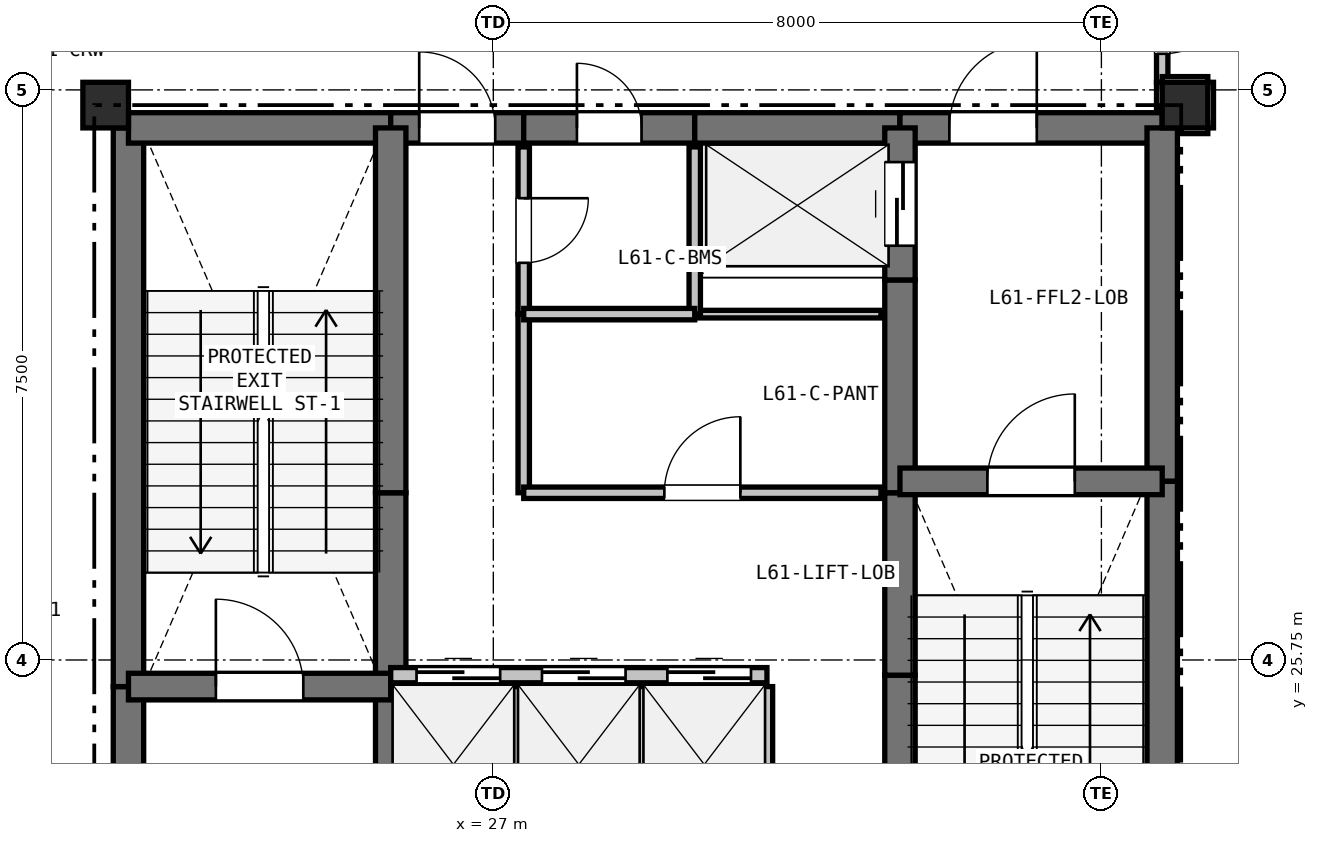
"""IFC4 building model, lengths in metres.
Left out: names, types, materials, properties, quantities, classifications, styles, units other than length and angle.
Written with IfcOpenShell. Run it as: python <this file> out.ifc"""

import sys

from ifc_helpers import new_model, si_unit, direction, frame, frame_2d, origin, origin_2d, place, context, subcontext, project, spatial, rectangle, extrude, element, fill, save


model = new_model("IFC4")
c1 = context("Model", 3, precision=1e-05, world=origin(), true_north=direction((0.0, 1.0)))
c2 = subcontext(c1, "Body", "Model", "MODEL_VIEW")
j1 = project(units=[si_unit("LENGTHUNIT", "METRE"), si_unit("PLANEANGLEUNIT", "RADIAN")], contexts=[c1])
p1 = place(None, origin())
s1 = spatial("IfcSite", under=j1, at=p1, CompositionType="ELEMENT")
p2 = place(p1, origin())
s2 = spatial("IfcBuilding", under=s1, at=p2, CompositionType="ELEMENT")
p3 = place(p2, frame((0.0, 0.0, 218.4)))
s3 = spatial("IfcBuildingStorey", under=s2, at=p3, CompositionType="ELEMENT", Elevation=218.4)
for number, where, z_axis, x_axis in (
    (1, (21.9, 33.05, 0.0), (0.0, 0.0, 1.0), (1.0, 0.0, 0.0)),
    (2, (36.1, 33.05, 0.0), (0.0, 0.0, 1.0), (1.0, 0.0, 0.0)),
):
    element("IfcColumn", number, at=place(p3, frame(where, z_axis=z_axis, x_axis=x_axis)), inside=s3, PredefinedType="COLUMN", context=c2, shape_type="SweptSolid", body=[
        extrude(rectangle(XDim=0.6, YDim=0.6, at=origin_2d()), origin(), (0.0, 0.0, 1.0), 4.8),
    ])
p4 = place(p3, frame((22.2, 20.75, 0.0), z_axis=(0.0, 0.0, 1.0), x_axis=(0.0, 1.0, 0.0)))
e3 = element("IfcWall", 3, at=p4, inside=s3, PredefinedType="SHEAR", context=c2, shape_type="SweptSolid", body=[
    extrude(rectangle(XDim=4.65, YDim=0.4, at=frame_2d((2.325, 0.0))), origin(), (0.0, 0.0, 1.0), 4.58),
])
p5 = place(p3, frame((22.2, 25.4, 0.0), z_axis=(0.0, 0.0, 1.0), x_axis=(0.0, 1.0, 0.0)))
e4 = element("IfcWall", 4, at=p5, inside=s3, PredefinedType="SHEAR", context=c2, shape_type="SweptSolid", body=[
    extrude(rectangle(XDim=7.35, YDim=0.4, at=frame_2d((3.675, 0.0))), origin(), (0.0, 0.0, 1.0), 4.58),
])
p6 = place(p3, frame((22.2, 32.75, 0.0), z_axis=(0.0, 0.0, 1.0), x_axis=(1.0, 0.0, 0.0)))
e5 = element("IfcWall", 5, at=p6, inside=s3, PredefinedType="SHEAR", context=c2, shape_type="SweptSolid", body=[
    extrude(rectangle(XDim=3.45, YDim=0.4, at=frame_2d((1.725, 0.0))), origin(), (0.0, 0.0, 1.0), 4.58),
])
p7 = place(p3, frame((25.65, 32.75, 0.0), z_axis=(0.0, 0.0, 1.0), x_axis=(1.0, 0.0, 0.0)))
e6 = element("IfcWall", 6, at=p7, inside=s3, PredefinedType="SHEAR", context=c2, shape_type="SweptSolid", body=[
    extrude(rectangle(XDim=1.75, YDim=0.4, at=frame_2d((0.875, 0.0))), origin(), (0.0, 0.0, 1.0), 4.58),
])
p8 = place(p7, frame((0.375, 0.0, 0.0)))
e7 = element("IfcOpeningElement", 7, at=p8, cuts=e6, PredefinedType="OPENING", context=c2, shape_type="SweptSolid", body=[
    extrude(rectangle(XDim=1.0, YDim=2.15, at=frame_2d((0.5, 1.075))), frame((0.0, 0.21, 0.0), z_axis=(0.0, -1.0, 0.0), x_axis=(1.0, 0.0, 0.0)), (0.0, 0.0, 1.0), 0.42),
])
p9 = place(p3, frame((27.4, 32.75, 0.0), z_axis=(0.0, 0.0, 1.0), x_axis=(1.0, 0.0, 0.0)))
e8 = element("IfcWall", 8, at=p9, inside=s3, PredefinedType="SHEAR", context=c2, shape_type="SweptSolid", body=[
    extrude(rectangle(XDim=2.25, YDim=0.4, at=frame_2d((1.125, 0.0))), origin(), (0.0, 0.0, 1.0), 4.58),
])
p10 = place(p9, frame((0.7, 0.0, 0.0)))
e9 = element("IfcOpeningElement", 9, at=p10, cuts=e8, PredefinedType="OPENING", context=c2, shape_type="SweptSolid", body=[
    extrude(rectangle(XDim=0.85, YDim=2.1, at=frame_2d((0.425, 1.05))), frame((0.0, 0.21, 0.0), z_axis=(0.0, -1.0, 0.0), x_axis=(1.0, 0.0, 0.0)), (0.0, 0.0, 1.0), 0.42),
])
p11 = place(p3, frame((29.65, 32.75, 0.0), z_axis=(0.0, 0.0, 1.0), x_axis=(1.0, 0.0, 0.0)))
e10 = element("IfcWall", 10, at=p11, inside=s3, PredefinedType="SHEAR", context=c2, shape_type="SweptSolid", body=[
    extrude(rectangle(XDim=2.7, YDim=0.4, at=frame_2d((1.35, 0.0))), origin(), (0.0, 0.0, 1.0), 4.58),
])
p12 = place(p3, frame((32.35, 32.75, 0.0), z_axis=(0.0, 0.0, 1.0), x_axis=(1.0, 0.0, 0.0)))
e11 = element("IfcWall", 11, at=p12, inside=s3, PredefinedType="SHEAR", context=c2, shape_type="SweptSolid", body=[
    extrude(rectangle(XDim=3.45, YDim=0.4, at=frame_2d((1.725, 0.0))), origin(), (0.0, 0.0, 1.0), 4.58),
])
p13 = place(p12, frame((0.65, 0.0, 0.0)))
e12 = element("IfcOpeningElement", 12, at=p13, cuts=e11, PredefinedType="OPENING", context=c2, shape_type="SweptSolid", body=[
    extrude(rectangle(XDim=1.15, YDim=2.15, at=frame_2d((0.575, 1.075))), frame((0.0, 0.21, 0.0), z_axis=(0.0, -1.0, 0.0), x_axis=(1.0, 0.0, 0.0)), (0.0, 0.0, 1.0), 0.42),
])
p14 = place(p3, frame((35.8, 32.75, 0.0), z_axis=(0.0, 0.0, 1.0), x_axis=(0.0, -1.0, 0.0)))
e13 = element("IfcWall", 13, at=p14, inside=s3, PredefinedType="SHEAR", context=c2, shape_type="SweptSolid", body=[
    extrude(rectangle(XDim=4.65, YDim=0.4, at=frame_2d((2.325, 0.0))), origin(), (0.0, 0.0, 1.0), 4.58),
])
p15 = place(p3, frame((35.8, 28.1, 0.0), z_axis=(0.0, 0.0, 1.0), x_axis=(0.0, -1.0, 0.0)))
e14 = element("IfcWall", 14, at=p15, inside=s3, PredefinedType="SHEAR", context=c2, shape_type="SweptSolid", body=[
    extrude(rectangle(XDim=7.35, YDim=0.4, at=frame_2d((3.675, 0.0))), origin(), (0.0, 0.0, 1.0), 4.58),
])
p16 = place(p3, frame((25.65, 22.75, 0.0), z_axis=(0.0, 0.0, 1.0), x_axis=(0.0, 1.0, 0.0)))
e15 = element("IfcWall", 15, at=p16, inside=s3, PredefinedType="SHEAR", context=c2, shape_type="SweptSolid", body=[
    extrude(rectangle(XDim=2.8, YDim=0.4, at=frame_2d((1.4, 0.0))), origin(), (0.0, 0.0, 1.0), 4.58),
])
p17 = place(p3, frame((25.65, 25.55, 0.0), z_axis=(0.0, 0.0, 1.0), x_axis=(0.0, 1.0, 0.0)))
e16 = element("IfcWall", 16, at=p17, inside=s3, PredefinedType="SHEAR", context=c2, shape_type="SweptSolid", body=[
    extrude(rectangle(XDim=2.4, YDim=0.4, at=frame_2d((1.2, 0.0))), origin(), (0.0, 0.0, 1.0), 4.58),
])
for number, where, z_axis, x_axis in (
    (17, (25.65, 27.95, 0.0), (0.0, 0.0, 1.0), (0.0, 1.0, 0.0)),
    (18, (32.35, 20.75, 0.0), (0.0, 0.0, 1.0), (0.0, 1.0, 0.0)),
):
    element("IfcWall", number, at=place(p3, frame(where, z_axis=z_axis, x_axis=x_axis)), inside=s3, PredefinedType="SHEAR", context=c2, shape_type="SweptSolid", body=[
        extrude(rectangle(XDim=4.8, YDim=0.4, at=frame_2d((2.4, 0.0))), origin(), (0.0, 0.0, 1.0), 4.58),
    ])
p18 = place(p3, frame((32.35, 25.55, 0.0), z_axis=(0.0, 0.0, 1.0), x_axis=(0.0, 1.0, 0.0)))
e19 = element("IfcWall", 19, at=p18, inside=s3, PredefinedType="SHEAR", context=c2, shape_type="SweptSolid", body=[
    extrude(rectangle(XDim=2.4, YDim=0.4, at=frame_2d((1.2, 0.0))), origin(), (0.0, 0.0, 1.0), 4.58),
])
p19 = place(p3, frame((32.35, 27.95, 0.0), z_axis=(0.0, 0.0, 1.0), x_axis=(0.0, 1.0, 0.0)))
e20 = element("IfcWall", 20, at=p19, inside=s3, PredefinedType="SHEAR", context=c2, shape_type="SweptSolid", body=[
    extrude(rectangle(XDim=2.8, YDim=0.4, at=frame_2d((1.4, 0.0))), origin(), (0.0, 0.0, 1.0), 4.58),
])
p20 = place(p3, frame((32.35, 30.75, 0.0), z_axis=(0.0, 0.0, 1.0), x_axis=(0.0, 1.0, 0.0)))
e21 = element("IfcWall", 21, at=p20, inside=s3, PredefinedType="SHEAR", context=c2, shape_type="SweptSolid", body=[
    extrude(rectangle(XDim=2.0, YDim=0.4, at=frame_2d((1.0, 0.0))), origin(), (0.0, 0.0, 1.0), 4.58),
])
p21 = place(p20, frame((0.45, 0.0, 0.0)))
e22 = element("IfcOpeningElement", 22, at=p21, cuts=e21, PredefinedType="OPENING", context=c2, shape_type="SweptSolid", body=[
    extrude(rectangle(XDim=1.1, YDim=2.15, at=frame_2d((0.55, 1.075))), frame((0.0, 0.21, 0.0), z_axis=(0.0, -1.0, 0.0), x_axis=(1.0, 0.0, 0.0)), (0.0, 0.0, 1.0), 0.42),
])
p22 = place(p3, frame((22.2, 25.4, 0.0), z_axis=(0.0, 0.0, 1.0), x_axis=(1.0, 0.0, 0.0)))
e23 = element("IfcWall", 23, at=p22, inside=s3, PredefinedType="SHEAR", context=c2, shape_type="SweptSolid", body=[
    extrude(rectangle(XDim=3.45, YDim=0.35, at=frame_2d((1.725, 0.0))), origin(), (0.0, 0.0, 1.0), 4.58),
])
p23 = place(p22, frame((1.15, 0.0, 0.0)))
e24 = element("IfcOpeningElement", 24, at=p23, cuts=e23, PredefinedType="OPENING", context=c2, shape_type="SweptSolid", body=[
    extrude(rectangle(XDim=1.15, YDim=2.15, at=frame_2d((0.575, 1.075))), frame((0.0, 0.185, 0.0), z_axis=(0.0, -1.0, 0.0), x_axis=(1.0, 0.0, 0.0)), (0.0, 0.0, 1.0), 0.37),
])
p24 = place(p3, frame((32.35, 28.1, 0.0), z_axis=(0.0, 0.0, 1.0), x_axis=(1.0, 0.0, 0.0)))
e25 = element("IfcWall", 25, at=p24, inside=s3, PredefinedType="SHEAR", context=c2, shape_type="SweptSolid", body=[
    extrude(rectangle(XDim=3.45, YDim=0.35, at=frame_2d((1.725, 0.0))), origin(), (0.0, 0.0, 1.0), 4.58),
])
p25 = place(p24, frame((1.15, 0.0, 0.0)))
e26 = element("IfcOpeningElement", 26, at=p25, cuts=e25, PredefinedType="OPENING", context=c2, shape_type="SweptSolid", body=[
    extrude(rectangle(XDim=1.15, YDim=2.15, at=frame_2d((0.575, 1.075))), frame((0.0, 0.185, 0.0), z_axis=(0.0, -1.0, 0.0), x_axis=(1.0, 0.0, 0.0)), (0.0, 0.0, 1.0), 0.37),
])
p26 = place(p3, frame((25.65, 25.55, 0.0), z_axis=(0.0, 0.0, 1.0), x_axis=(1.0, 0.0, 0.0)))
e27 = element("IfcWall", 27, at=p26, inside=s3, PredefinedType="PARTITIONING", context=c2, shape_type="SweptSolid", body=[
    extrude(rectangle(XDim=4.95, YDim=0.2, at=frame_2d((2.475, 0.0))), origin(), (0.0, 0.0, 1.0), 4.58),
])
p27 = place(p26, frame((0.34, 0.0, 0.0)))
e28 = element("IfcOpeningElement", 28, at=p27, cuts=e27, PredefinedType="OPENING", context=c2, shape_type="SweptSolid", body=[
    extrude(rectangle(XDim=1.1, YDim=2.15, at=frame_2d((0.55, 1.075))), frame((0.0, 0.11, 0.0), z_axis=(0.0, -1.0, 0.0), x_axis=(1.0, 0.0, 0.0)), (0.0, 0.0, 1.0), 0.22),
])
p28 = place(p26, frame((1.99, 0.0, 0.0)))
e29 = element("IfcOpeningElement", 29, at=p28, cuts=e27, PredefinedType="OPENING", context=c2, shape_type="SweptSolid", body=[
    extrude(rectangle(XDim=1.1, YDim=2.15, at=frame_2d((0.55, 1.075))), frame((0.0, 0.11, 0.0), z_axis=(0.0, -1.0, 0.0), x_axis=(1.0, 0.0, 0.0)), (0.0, 0.0, 1.0), 0.22),
])
p29 = place(p26, frame((3.64, 0.0, 0.0)))
e30 = element("IfcOpeningElement", 30, at=p29, cuts=e27, PredefinedType="OPENING", context=c2, shape_type="SweptSolid", body=[
    extrude(rectangle(XDim=1.1, YDim=2.15, at=frame_2d((0.55, 1.075))), frame((0.0, 0.11, 0.0), z_axis=(0.0, -1.0, 0.0), x_axis=(1.0, 0.0, 0.0)), (0.0, 0.0, 1.0), 0.22),
])
p30 = place(p3, frame((32.1, 30.3, 0.0), z_axis=(0.0, 0.0, 1.0), x_axis=(-1.0, 0.0, 0.0)))
e31 = element("IfcWall", 31, at=p30, inside=s3, PredefinedType="PARTITIONING", context=c2, shape_type="SweptSolid", body=[
    extrude(rectangle(XDim=2.45, YDim=0.1, at=frame_2d((1.225, 0.0))), origin(), (0.0, 0.0, 1.0), 4.58),
])
p31 = place(p3, frame((29.65, 30.3, 0.0), z_axis=(0.0, 0.0, 1.0), x_axis=(0.0, 1.0, 0.0)))
e32 = element("IfcWall", 32, at=p31, inside=s3, PredefinedType="PARTITIONING", context=c2, shape_type="SweptSolid", body=[
    extrude(rectangle(XDim=2.2, YDim=0.15, at=frame_2d((1.1, 0.0))), origin(), (0.0, 0.0, 1.0), 4.58),
])
p32 = place(p3, frame((27.3, 25.4, 0.0), z_axis=(0.0, 0.0, 1.0), x_axis=(0.0, -1.0, 0.0)))
e33 = element("IfcWall", 33, at=p32, inside=s3, PredefinedType="PARTITIONING", context=c2, shape_type="SweptSolid", body=[
    extrude(rectangle(XDim=2.2, YDim=0.1, at=frame_2d((1.1, 0.0))), origin(), (0.0, 0.0, 1.0), 4.58),
])
p33 = place(p3, frame((28.95, 25.4, 0.0), z_axis=(0.0, 0.0, 1.0), x_axis=(0.0, -1.0, 0.0)))
e34 = element("IfcWall", 34, at=p33, inside=s3, PredefinedType="PARTITIONING", context=c2, shape_type="SweptSolid", body=[
    extrude(rectangle(XDim=2.2, YDim=0.125, at=frame_2d((1.1, 0.0))), origin(), (0.0, 0.0, 1.0), 4.58),
])
p34 = place(p3, frame((30.6, 25.4, 0.0), z_axis=(0.0, 0.0, 1.0), x_axis=(0.0, -1.0, 0.0)))
e35 = element("IfcWall", 35, at=p34, inside=s3, PredefinedType="PARTITIONING", context=c2, shape_type="SweptSolid", body=[
    extrude(rectangle(XDim=2.2, YDim=0.15, at=frame_2d((1.1, 0.0))), origin(), (0.0, 0.0, 1.0), 4.58),
])
p35 = place(p3, frame((27.4, 32.5, 0.0), z_axis=(0.0, 0.0, 1.0), x_axis=(0.0, -1.0, 0.0)))
e36 = element("IfcWall", 36, at=p35, inside=s3, PredefinedType="PARTITIONING", context=c2, shape_type="SweptSolid", body=[
    extrude(rectangle(XDim=2.2, YDim=0.15, at=frame_2d((1.1, 0.0))), origin(), (0.0, 0.0, 1.0), 4.58),
])
p36 = place(p35, frame((0.675, 0.0, 0.0)))
e37 = element("IfcOpeningElement", 37, at=p36, cuts=e36, PredefinedType="OPENING", context=c2, shape_type="SweptSolid", body=[
    extrude(rectangle(XDim=0.85, YDim=2.1, at=frame_2d((0.425, 1.05))), frame((0.0, 0.085, 0.0), z_axis=(0.0, -1.0, 0.0), x_axis=(1.0, 0.0, 0.0)), (0.0, 0.0, 1.0), 0.17),
])
p37 = place(p3, frame((27.4, 30.3, 0.0), z_axis=(0.0, 0.0, 1.0), x_axis=(0.0, -1.0, 0.0)))
e38 = element("IfcWall", 38, at=p37, inside=s3, PredefinedType="PARTITIONING", context=c2, shape_type="SweptSolid", body=[
    extrude(rectangle(XDim=2.35, YDim=0.15, at=frame_2d((1.175, 0.0))), origin(), (0.0, 0.0, 1.0), 4.58),
])
p38 = place(p3, frame((27.4, 27.95, 0.0), z_axis=(0.0, 0.0, 1.0), x_axis=(1.0, 0.0, 0.0)))
e39 = element("IfcWall", 39, at=p38, inside=s3, PredefinedType="PARTITIONING", context=c2, shape_type="SweptSolid", body=[
    extrude(rectangle(XDim=4.7, YDim=0.15, at=frame_2d((2.35, 0.0))), origin(), (0.0, 0.0, 1.0), 4.58),
])
p39 = place(p38, frame((1.85, 0.0, 0.0)))
e40 = element("IfcOpeningElement", 40, at=p39, cuts=e39, PredefinedType="OPENING", context=c2, shape_type="SweptSolid", body=[
    extrude(rectangle(XDim=1.0, YDim=2.15, at=frame_2d((0.5, 1.075))), frame((0.0, 0.085, 0.0), z_axis=(0.0, -1.0, 0.0), x_axis=(1.0, 0.0, 0.0)), (0.0, 0.0, 1.0), 0.17),
])
p40 = place(p3, frame((35.8, 35.1, 0.0), z_axis=(0.0, 0.0, 1.0), x_axis=(0.0, -1.0, 0.0)))
e41 = element("IfcWall", 41, at=p40, inside=s3, PredefinedType="PARTITIONING", context=c2, shape_type="SweptSolid", body=[
    extrude(rectangle(XDim=1.75, YDim=0.15, at=frame_2d((0.875, 0.0))), origin(), (0.0, 0.0, 1.0), 3.215),
])
p41 = place(p40, frame((0.375, 0.0, 0.0)))
e42 = element("IfcOpeningElement", 42, at=p41, cuts=e41, PredefinedType="OPENING", context=c2, shape_type="SweptSolid", body=[
    extrude(rectangle(XDim=1.0, YDim=2.15, at=frame_2d((0.5, 1.075))), frame((0.0, 0.085, 0.0), z_axis=(0.0, -1.0, 0.0), x_axis=(1.0, 0.0, 0.0)), (0.0, 0.0, 1.0), 0.17),
])
p42 = place(p3, frame((35.8, 33.35, 0.0), z_axis=(0.0, 0.0, 1.0), x_axis=(0.0, -1.0, 0.0)))
e43 = element("IfcWall", 43, at=p42, inside=s3, PredefinedType="PARTITIONING", context=c2, shape_type="SweptSolid", body=[
    extrude(rectangle(XDim=0.35, YDim=0.15, at=frame_2d((0.175, 0.0))), origin(), (0.0, 0.0, 1.0), 3.215),
])
p43 = place(p3, frame((36.4, 32.75, 0.0), z_axis=(0.0, 0.0, 1.0), x_axis=(0.0, 1.0, 0.0)))
e44 = element("IfcWall", 44, at=p43, inside=s3, PredefinedType="PARTITIONING", context=c2, shape_type="SweptSolid", body=[
    extrude(rectangle(XDim=0.6, YDim=0.15, at=frame_2d((0.3, 0.0))), origin(), (0.0, 0.0, 1.0), 3.215),
])
p44 = place(p3, frame((36.4, 33.35, 0.0), z_axis=(0.0, 0.0, 1.0), x_axis=(-1.0, 0.0, 0.0)))
e45 = element("IfcWall", 45, at=p44, inside=s3, PredefinedType="PARTITIONING", context=c2, shape_type="SweptSolid", body=[
    extrude(rectangle(XDim=0.6, YDim=0.15, at=frame_2d((0.3, 0.0))), origin(), (0.0, 0.0, 1.0), 3.215),
])
p45 = place(p3, frame((36.05, 32.75, 0.0), z_axis=(0.0, 0.0, 1.0), x_axis=(1.0, 0.0, 0.0)))
e46 = element("IfcWall", 46, at=p45, inside=s3, PredefinedType="PARTITIONING", context=c2, shape_type="SweptSolid", body=[
    extrude(rectangle(XDim=0.35, YDim=0.15, at=frame_2d((0.175, 0.0))), origin(), (0.0, 0.0, 1.0), 4.105),
])
p46 = place(p3, frame((27.4, 30.3, 0.0), z_axis=(0.0, 0.0, 1.0), x_axis=(1.0, 0.0, 0.0)))
e47 = element("IfcWall", 47, at=p46, inside=s3, PredefinedType="PARTITIONING", context=c2, shape_type="SweptSolid", body=[
    extrude(rectangle(XDim=2.25, YDim=0.15, at=frame_2d((1.125, 0.0))), origin(), (0.0, 0.0, 1.0), 4.58),
])
p47 = place(p27, origin())
e48 = element("IfcDoor", 48, at=p47, inside=s3, OperationType="SLIDING_TO_LEFT", PredefinedType="DOOR", context=c2, shape_type="SweptSolid", body=[
    extrude(rectangle(XDim=1.1, YDim=2.15, at=frame_2d((0.55, 1.075))), frame((0.0, 0.025, 0.0), z_axis=(0.0, -1.0, 0.0), x_axis=(1.0, 0.0, 0.0)), (0.0, 0.0, 1.0), 0.05),
])
fill(e28, e48)
p48 = place(p28, origin())
e49 = element("IfcDoor", 49, at=p48, inside=s3, OperationType="SLIDING_TO_LEFT", PredefinedType="DOOR", context=c2, shape_type="SweptSolid", body=[
    extrude(rectangle(XDim=1.1, YDim=2.15, at=frame_2d((0.55, 1.075))), frame((0.0, 0.025, 0.0), z_axis=(0.0, -1.0, 0.0), x_axis=(1.0, 0.0, 0.0)), (0.0, 0.0, 1.0), 0.05),
])
fill(e29, e49)
p49 = place(p29, origin())
e50 = element("IfcDoor", 50, at=p49, inside=s3, OperationType="SLIDING_TO_LEFT", PredefinedType="DOOR", context=c2, shape_type="SweptSolid", body=[
    extrude(rectangle(XDim=1.1, YDim=2.15, at=frame_2d((0.55, 1.075))), frame((0.0, 0.025, 0.0), z_axis=(0.0, -1.0, 0.0), x_axis=(1.0, 0.0, 0.0)), (0.0, 0.0, 1.0), 0.05),
])
fill(e30, e50)
p50 = place(p8, origin())
e51 = element("IfcDoor", 51, at=p50, inside=s3, OperationType="SINGLE_SWING_LEFT", PredefinedType="DOOR", context=c2, shape_type="SweptSolid", body=[
    extrude(rectangle(XDim=1.0, YDim=2.15, at=frame_2d((0.5, 1.075))), frame((0.0, 0.025, 0.0), z_axis=(0.0, -1.0, 0.0), x_axis=(1.0, 0.0, 0.0)), (0.0, 0.0, 1.0), 0.05),
])
fill(e7, e51)
p51 = place(p21, origin())
e52 = element("IfcDoor", 52, at=p51, inside=s3, OperationType="SLIDING_TO_LEFT", PredefinedType="DOOR", context=c2, shape_type="SweptSolid", body=[
    extrude(rectangle(XDim=1.1, YDim=2.15, at=frame_2d((0.55, 1.075))), frame((0.0, 0.025, 0.0), z_axis=(0.0, -1.0, 0.0), x_axis=(1.0, 0.0, 0.0)), (0.0, 0.0, 1.0), 0.05),
])
fill(e22, e52)
p52 = place(p23, origin())
e53 = element("IfcDoor", 53, at=p52, inside=s3, OperationType="SINGLE_SWING_LEFT", PredefinedType="DOOR", context=c2, shape_type="SweptSolid", body=[
    extrude(rectangle(XDim=1.15, YDim=2.15, at=frame_2d((0.575, 1.075))), frame((0.0, 0.025, 0.0), z_axis=(0.0, -1.0, 0.0), x_axis=(1.0, 0.0, 0.0)), (0.0, 0.0, 1.0), 0.05),
])
fill(e24, e53)
p53 = place(p25, origin())
e54 = element("IfcDoor", 54, at=p53, inside=s3, OperationType="SINGLE_SWING_RIGHT", PredefinedType="DOOR", context=c2, shape_type="SweptSolid", body=[
    extrude(rectangle(XDim=1.15, YDim=2.15, at=frame_2d((0.575, 1.075))), frame((0.0, 0.025, 0.0), z_axis=(0.0, -1.0, 0.0), x_axis=(1.0, 0.0, 0.0)), (0.0, 0.0, 1.0), 0.05),
])
fill(e26, e54)
p54 = place(p13, origin())
e55 = element("IfcDoor", 55, at=p54, inside=s3, OperationType="SINGLE_SWING_RIGHT", PredefinedType="DOOR", context=c2, shape_type="SweptSolid", body=[
    extrude(rectangle(XDim=1.15, YDim=2.15, at=frame_2d((0.575, 1.075))), frame((0.0, 0.025, 0.0), z_axis=(0.0, -1.0, 0.0), x_axis=(1.0, 0.0, 0.0)), (0.0, 0.0, 1.0), 0.05),
])
fill(e12, e55)
p55 = place(p39, origin())
e56 = element("IfcDoor", 56, at=p55, inside=s3, OperationType="SINGLE_SWING_RIGHT", PredefinedType="DOOR", context=c2, shape_type="SweptSolid", body=[
    extrude(rectangle(XDim=1.0, YDim=2.15, at=frame_2d((0.5, 1.075))), frame((0.0, 0.025, 0.0), z_axis=(0.0, -1.0, 0.0), x_axis=(1.0, 0.0, 0.0)), (0.0, 0.0, 1.0), 0.05),
])
fill(e40, e56)
p56 = place(p36, origin())
e57 = element("IfcDoor", 57, at=p56, inside=s3, OperationType="SINGLE_SWING_LEFT", PredefinedType="DOOR", context=c2, shape_type="SweptSolid", body=[
    extrude(rectangle(XDim=0.85, YDim=2.1, at=frame_2d((0.425, 1.05))), frame((0.0, 0.025, 0.0), z_axis=(0.0, -1.0, 0.0), x_axis=(1.0, 0.0, 0.0)), (0.0, 0.0, 1.0), 0.05),
])
fill(e37, e57)
p57 = place(p41, origin())
e58 = element("IfcDoor", 58, at=p57, inside=s3, OperationType="SINGLE_SWING_LEFT", PredefinedType="DOOR", context=c2, shape_type="SweptSolid", body=[
    extrude(rectangle(XDim=1.0, YDim=2.15, at=frame_2d((0.5, 1.075))), frame((0.0, 0.025, 0.0), z_axis=(0.0, -1.0, 0.0), x_axis=(1.0, 0.0, 0.0)), (0.0, 0.0, 1.0), 0.05),
])
fill(e42, e58)
p58 = place(p10, origin())
e59 = element("IfcDoor", 59, at=p58, inside=s3, OperationType="SINGLE_SWING_LEFT", PredefinedType="DOOR", context=c2, shape_type="SweptSolid", body=[
    extrude(rectangle(XDim=0.85, YDim=2.1, at=frame_2d((0.425, 1.05))), frame((0.0, 0.025, 0.0), z_axis=(0.0, -1.0, 0.0), x_axis=(1.0, 0.0, 0.0)), (0.0, 0.0, 1.0), 0.05),
])
fill(e9, e59)
save(model, sys.argv[1])
